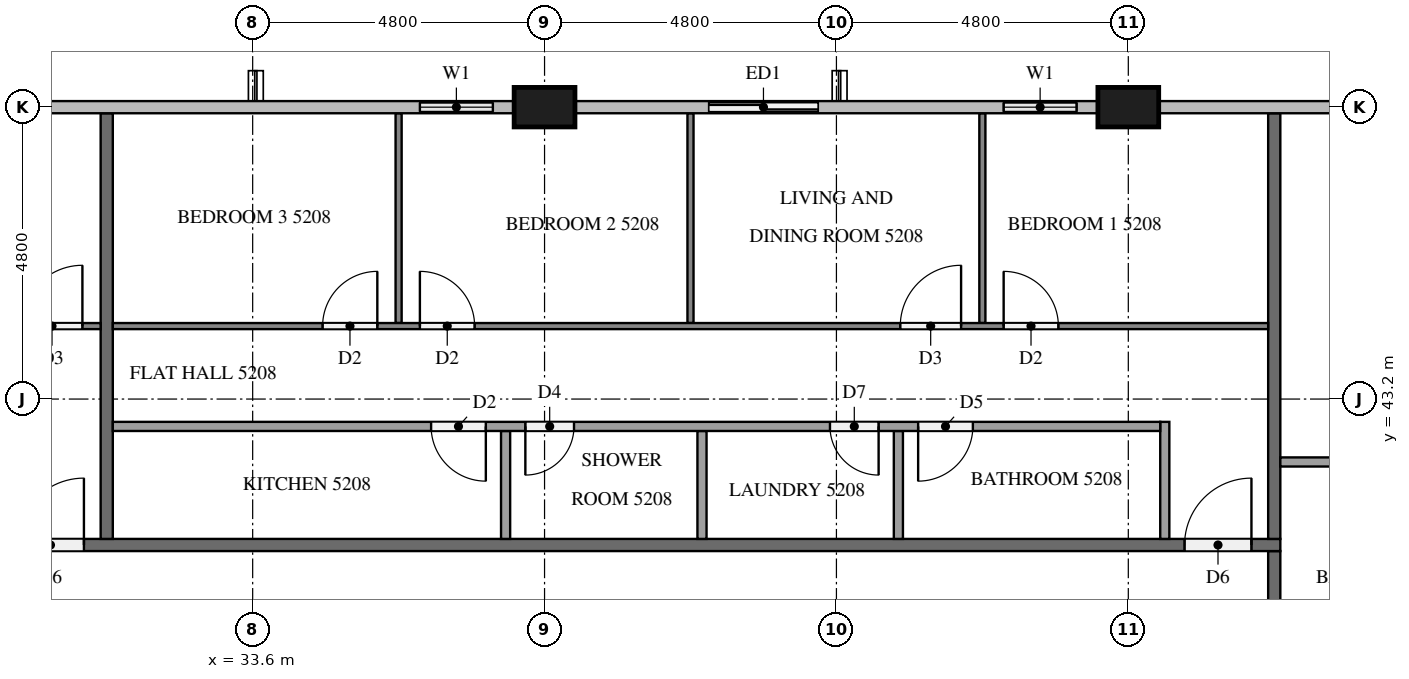
"""IFC4 building model, lengths in metres.
Left out: names, types, materials, properties, quantities, classifications, styles, units other than length and angle.
Written with IfcOpenShell. Run it as: python <this file> out.ifc"""

import sys

from ifc_helpers import new_model, si_unit, direction, frame, frame_2d, origin, origin_2d, place, context, subcontext, project, spatial, rectangle, extrude, element, fill, save


model = new_model("IFC4")
c1 = context("Model", 3, precision=1e-05, world=origin(), true_north=direction((0.0, 1.0)))
c2 = subcontext(c1, "Body", "Model", "MODEL_VIEW")
j1 = project(units=[si_unit("LENGTHUNIT", "METRE"), si_unit("PLANEANGLEUNIT", "RADIAN")], contexts=[c1])
p1 = place(None, origin())
s1 = spatial("IfcSite", under=j1, at=p1, CompositionType="ELEMENT")
p2 = place(p1, origin())
s2 = spatial("IfcBuilding", under=s1, at=p2, CompositionType="ELEMENT")
p3 = place(p2, frame((0.0, 0.0, 199.9)))
s3 = spatial("IfcBuildingStorey", under=s2, at=p3, CompositionType="ELEMENT", Elevation=199.9)
for number, where, z_axis, x_axis in (
    (1, (48.0, 48.0, 0.0), (0.0, 0.0, 1.0), (1.0, 0.0, 0.0)),
    (2, (38.4, 48.0, 0.0), (0.0, 0.0, 1.0), (1.0, 0.0, 0.0)),
):
    element("IfcColumn", number, at=place(p3, frame(where, z_axis=z_axis, x_axis=x_axis)), inside=s3, PredefinedType="COLUMN", context=c2, shape_type="SweptSolid", body=[
        extrude(rectangle(XDim=1.0, YDim=0.65, at=origin_2d()), origin(), (0.0, 0.0, 1.0), 3.1),
    ])
p4 = place(p3, frame((47.5, 48.0, 0.0), z_axis=(0.0, 0.0, 1.0), x_axis=(-1.0, 0.0, 0.0)))
e3 = element("IfcWall", 3, at=p4, inside=s3, PredefinedType="SOLIDWALL", context=c2, shape_type="SweptSolid", body=[
    extrude(rectangle(XDim=1.9, YDim=0.15, at=frame_2d((0.95, 0.0))), origin(), (0.0, 0.0, 1.0), 3.1),
])
p5 = place(p4, frame((0.35, 0.0, 0.9)))
e4 = element("IfcOpeningElement", 4, at=p5, cuts=e3, PredefinedType="OPENING", context=c2, shape_type="SweptSolid", body=[
    extrude(rectangle(XDim=1.2, YDim=1.4, at=frame_2d((0.6, 0.7))), frame((0.0, 0.085, 0.0), z_axis=(0.0, -1.0, 0.0), x_axis=(1.0, 0.0, 0.0)), (0.0, 0.0, 1.0), 0.17),
])
p6 = place(p3, frame((43.2, 48.0, 0.0), z_axis=(0.0, 0.0, 1.0), x_axis=(-1.0, 0.0, 0.0)))
e5 = element("IfcWall", 5, at=p6, inside=s3, PredefinedType="SOLIDWALL", context=c2, shape_type="SweptSolid", body=[
    extrude(rectangle(XDim=2.4, YDim=0.15, at=frame_2d((1.2, 0.0))), origin(), (0.0, 0.0, 1.0), 3.1),
])
p7 = place(p6, frame((0.3, 0.0, 0.0)))
e6 = element("IfcOpeningElement", 6, at=p7, cuts=e5, PredefinedType="OPENING", context=c2, shape_type="SweptSolid", body=[
    extrude(rectangle(XDim=1.8, YDim=2.4, at=frame_2d((0.9, 1.2))), frame((0.0, 0.085, 0.0), z_axis=(0.0, -1.0, 0.0), x_axis=(1.0, 0.0, 0.0)), (0.0, 0.0, 1.0), 0.17),
])
p8 = place(p3, frame((37.9, 48.0, 0.0), z_axis=(0.0, 0.0, 1.0), x_axis=(-1.0, 0.0, 0.0)))
e7 = element("IfcWall", 7, at=p8, inside=s3, PredefinedType="SOLIDWALL", context=c2, shape_type="SweptSolid", body=[
    extrude(rectangle(XDim=1.9, YDim=0.15, at=frame_2d((0.95, 0.0))), origin(), (0.0, 0.0, 1.0), 3.1),
])
p9 = place(p8, frame((0.35, 0.0, 0.9)))
e8 = element("IfcOpeningElement", 8, at=p9, cuts=e7, PredefinedType="OPENING", context=c2, shape_type="SweptSolid", body=[
    extrude(rectangle(XDim=1.2, YDim=1.4, at=frame_2d((0.6, 0.7))), frame((0.0, 0.085, 0.0), z_axis=(0.0, -1.0, 0.0), x_axis=(1.0, 0.0, 0.0)), (0.0, 0.0, 1.0), 0.17),
])
p10 = place(p3, frame((50.4, 40.7, 0.0), z_axis=(0.0, 0.0, 1.0), x_axis=(0.0, -1.0, 0.0)))
e9 = element("IfcWall", 9, at=p10, inside=s3, PredefinedType="PARTITIONING", context=c2, shape_type="SweptSolid", body=[
    extrude(rectangle(XDim=28.6, YDim=0.2, at=frame_2d((14.3, 0.0))), origin(), (0.0, 0.0, 1.0), 3.1),
])
p11 = place(p10, frame((21.875, 0.0, 0.0)))
e10 = element("IfcOpeningElement", 10, at=p11, cuts=e9, PredefinedType="OPENING", context=c2, shape_type="SweptSolid", body=[
    extrude(rectangle(XDim=1.1, YDim=2.1, at=frame_2d((0.55, 1.05))), frame((0.0, 0.11, 0.0), z_axis=(0.0, -1.0, 0.0), x_axis=(1.0, 0.0, 0.0)), (0.0, 0.0, 1.0), 0.22),
])
p12 = place(p10, frame((7.525, 0.0, 0.0)))
e11 = element("IfcOpeningElement", 11, at=p12, cuts=e9, PredefinedType="OPENING", context=c2, shape_type="SweptSolid", body=[
    extrude(rectangle(XDim=1.0, YDim=2.1, at=frame_2d((0.5, 1.05))), frame((0.0, 0.11, 0.0), z_axis=(0.0, -1.0, 0.0), x_axis=(1.0, 0.0, 0.0)), (0.0, 0.0, 1.0), 0.22),
])
p13 = place(p10, frame((5.675, 0.0, 0.0)))
e12 = element("IfcOpeningElement", 12, at=p13, cuts=e9, PredefinedType="OPENING", context=c2, shape_type="SweptSolid", body=[
    extrude(rectangle(XDim=1.0, YDim=2.1, at=frame_2d((0.5, 1.05))), frame((0.0, 0.11, 0.0), z_axis=(0.0, -1.0, 0.0), x_axis=(1.0, 0.0, 0.0)), (0.0, 0.0, 1.0), 0.22),
])
p14 = place(p3, frame((11.9, 40.8, 0.0), z_axis=(0.0, 0.0, 1.0), x_axis=(1.0, 0.0, 0.0)))
e13 = element("IfcWall", 13, at=p14, inside=s3, PredefinedType="PARTITIONING", context=c2, shape_type="SweptSolid", body=[
    extrude(rectangle(XDim=38.6, YDim=0.2, at=frame_2d((19.3, 0.0))), origin(), (0.0, 0.0, 1.0), 3.1),
])
p15 = place(p14, frame((37.025, 0.0, 0.0)))
e14 = element("IfcOpeningElement", 14, at=p15, cuts=e13, PredefinedType="OPENING", context=c2, shape_type="SweptSolid", body=[
    extrude(rectangle(XDim=1.1, YDim=2.1, at=frame_2d((0.55, 1.05))), frame((0.0, 0.11, 0.0), z_axis=(0.0, -1.0, 0.0), x_axis=(1.0, 0.0, 0.0)), (0.0, 0.0, 1.0), 0.22),
])
p16 = place(p14, frame((17.825, 0.0, 0.0)))
e15 = element("IfcOpeningElement", 15, at=p16, cuts=e13, PredefinedType="OPENING", context=c2, shape_type="SweptSolid", body=[
    extrude(rectangle(XDim=1.1, YDim=2.1, at=frame_2d((0.55, 1.05))), frame((0.0, 0.11, 0.0), z_axis=(0.0, -1.0, 0.0), x_axis=(1.0, 0.0, 0.0)), (0.0, 0.0, 1.0), 0.22),
])
for number, where, z_axis, x_axis in (
    (16, (50.4, 40.9, 0.0), (0.0, 0.0, 1.0), (0.0, 1.0, 0.0)),
    (17, (31.2, 47.9, 0.0), (0.0, 0.0, 1.0), (0.0, -1.0, 0.0)),
):
    element("IfcWall", number, at=place(p3, frame(where, z_axis=z_axis, x_axis=x_axis)), inside=s3, PredefinedType="PARTITIONING", context=c2, shape_type="SweptSolid", body=[
        extrude(rectangle(XDim=7.0, YDim=0.2, at=frame_2d((3.5, 0.0))), origin(), (0.0, 0.0, 1.0), 3.1),
    ])
p17 = place(p3, frame((50.5, 42.165, 0.0), z_axis=(0.0, 0.0, 1.0), x_axis=(1.0, 0.0, 0.0)))
e18 = element("IfcWall", 18, at=p17, inside=s3, PredefinedType="PARTITIONING", context=c2, shape_type="SweptSolid", body=[
    extrude(rectangle(XDim=4.175, YDim=0.15, at=frame_2d((2.087, 0.0))), origin(), (0.0, 0.0, 1.0), 3.1),
])
for number, where, z_axis, x_axis in (
    (19, (45.6, 44.45, 0.0), (0.0, 0.0, 1.0), (0.0, 1.0, 0.0)),
    (20, (40.8, 44.45, 0.0), (0.0, 0.0, 1.0), (0.0, 1.0, 0.0)),
    (21, (36.0, 44.45, 0.0), (0.0, 0.0, 1.0), (0.0, 1.0, 0.0)),
):
    element("IfcWall", number, at=place(p3, frame(where, z_axis=z_axis, x_axis=x_axis)), inside=s3, PredefinedType="PARTITIONING", context=c2, shape_type="SweptSolid", body=[
        extrude(rectangle(XDim=3.45, YDim=0.1, at=frame_2d((1.725, 0.0))), origin(), (0.0, 0.0, 1.0), 3.1),
    ])
p18 = place(p3, frame((31.3, 44.4, 0.0), z_axis=(0.0, 0.0, 1.0), x_axis=(1.0, 0.0, 0.0)))
e22 = element("IfcWall", 22, at=p18, inside=s3, PredefinedType="PARTITIONING", context=c2, shape_type="SweptSolid", body=[
    extrude(rectangle(XDim=19.0, YDim=0.1, at=frame_2d((9.5, 0.0))), origin(), (0.0, 0.0, 1.0), 3.1),
])
p19 = place(p18, frame((14.65, 0.0, 0.0)))
e23 = element("IfcOpeningElement", 23, at=p19, cuts=e22, PredefinedType="OPENING", context=c2, shape_type="SweptSolid", body=[
    extrude(rectangle(XDim=0.9, YDim=2.1, at=frame_2d((0.45, 1.05))), frame((0.0, 0.06, 0.0), z_axis=(0.0, -1.0, 0.0), x_axis=(1.0, 0.0, 0.0)), (0.0, 0.0, 1.0), 0.12),
])
p20 = place(p18, frame((12.95, 0.0, 0.0)))
e24 = element("IfcOpeningElement", 24, at=p20, cuts=e22, PredefinedType="OPENING", context=c2, shape_type="SweptSolid", body=[
    extrude(rectangle(XDim=1.0, YDim=2.1, at=frame_2d((0.5, 1.05))), frame((0.0, 0.06, 0.0), z_axis=(0.0, -1.0, 0.0), x_axis=(1.0, 0.0, 0.0)), (0.0, 0.0, 1.0), 0.12),
])
p21 = place(p18, frame((5.05, 0.0, 0.0)))
e25 = element("IfcOpeningElement", 25, at=p21, cuts=e22, PredefinedType="OPENING", context=c2, shape_type="SweptSolid", body=[
    extrude(rectangle(XDim=0.9, YDim=2.1, at=frame_2d((0.45, 1.05))), frame((0.0, 0.06, 0.0), z_axis=(0.0, -1.0, 0.0), x_axis=(1.0, 0.0, 0.0)), (0.0, 0.0, 1.0), 0.12),
])
p22 = place(p18, frame((3.45, 0.0, 0.0)))
e26 = element("IfcOpeningElement", 26, at=p22, cuts=e22, PredefinedType="OPENING", context=c2, shape_type="SweptSolid", body=[
    extrude(rectangle(XDim=0.9, YDim=2.1, at=frame_2d((0.45, 1.05))), frame((0.0, 0.06, 0.0), z_axis=(0.0, -1.0, 0.0), x_axis=(1.0, 0.0, 0.0)), (0.0, 0.0, 1.0), 0.12),
])
for number, where, z_axis, x_axis in (
    (27, (44.219, 40.9, 0.0), (0.0, 0.0, 1.0), (0.0, 1.0, 0.0)),
    (28, (40.989, 40.9, 0.0), (0.0, 0.0, 1.0), (0.0, 1.0, 0.0)),
    (29, (37.76, 40.9, 0.0), (0.0, 0.0, 1.0), (0.0, 1.0, 0.0)),
):
    element("IfcWall", number, at=place(p3, frame(where, z_axis=z_axis, x_axis=x_axis)), inside=s3, PredefinedType="PARTITIONING", context=c2, shape_type="SweptSolid", body=[
        extrude(rectangle(XDim=1.775, YDim=0.15, at=frame_2d((0.888, 0.0))), origin(), (0.0, 0.0, 1.0), 3.1),
    ])
p23 = place(p3, frame((48.6, 40.9, 0.0), z_axis=(0.0, 0.0, 1.0), x_axis=(0.0, 1.0, 0.0)))
e30 = element("IfcWall", 30, at=p23, inside=s3, PredefinedType="PARTITIONING", context=c2, shape_type="SweptSolid", body=[
    extrude(rectangle(XDim=1.925, YDim=0.15, at=frame_2d((0.962, 0.0))), origin(), (0.0, 0.0, 1.0), 3.1),
])
p24 = place(p3, frame((48.525, 42.75, 0.0), z_axis=(0.0, 0.0, 1.0), x_axis=(-1.0, 0.0, 0.0)))
e31 = element("IfcWall", 31, at=p24, inside=s3, PredefinedType="PARTITIONING", context=c2, shape_type="SweptSolid", body=[
    extrude(rectangle(XDim=17.225, YDim=0.15, at=frame_2d((8.612, 0.0))), origin(), (0.0, 0.0, 1.0), 3.1),
])
p25 = place(p24, frame((3.081, 0.0, 0.0)))
e32 = element("IfcOpeningElement", 32, at=p25, cuts=e31, PredefinedType="OPENING", context=c2, shape_type="SweptSolid", body=[
    extrude(rectangle(XDim=0.9, YDim=2.1, at=frame_2d((0.45, 1.05))), frame((0.0, 0.085, 0.0), z_axis=(0.0, -1.0, 0.0), x_axis=(1.0, 0.0, 0.0)), (0.0, 0.0, 1.0), 0.17),
])
p26 = place(p24, frame((4.631, 0.0, 0.0)))
e33 = element("IfcOpeningElement", 33, at=p26, cuts=e31, PredefinedType="OPENING", context=c2, shape_type="SweptSolid", body=[
    extrude(rectangle(XDim=0.8, YDim=2.1, at=frame_2d((0.4, 1.05))), frame((0.0, 0.085, 0.0), z_axis=(0.0, -1.0, 0.0), x_axis=(1.0, 0.0, 0.0)), (0.0, 0.0, 1.0), 0.17),
])
p27 = place(p24, frame((9.641, 0.0, 0.0)))
e34 = element("IfcOpeningElement", 34, at=p27, cuts=e31, PredefinedType="OPENING", context=c2, shape_type="SweptSolid", body=[
    extrude(rectangle(XDim=0.8, YDim=2.1, at=frame_2d((0.4, 1.05))), frame((0.0, 0.085, 0.0), z_axis=(0.0, -1.0, 0.0), x_axis=(1.0, 0.0, 0.0)), (0.0, 0.0, 1.0), 0.17),
])
p28 = place(p24, frame((11.091, 0.0, 0.0)))
e35 = element("IfcOpeningElement", 35, at=p28, cuts=e31, PredefinedType="OPENING", context=c2, shape_type="SweptSolid", body=[
    extrude(rectangle(XDim=0.9, YDim=2.1, at=frame_2d((0.45, 1.05))), frame((0.0, 0.085, 0.0), z_axis=(0.0, -1.0, 0.0), x_axis=(1.0, 0.0, 0.0)), (0.0, 0.0, 1.0), 0.17),
])
p29 = place(p3, frame((12.1, 44.4, 0.0), z_axis=(0.0, 0.0, 1.0), x_axis=(1.0, 0.0, 0.0)))
e36 = element("IfcWall", 36, at=p29, inside=s3, PredefinedType="PARTITIONING", context=c2, shape_type="SweptSolid", body=[
    extrude(rectangle(XDim=19.0, YDim=0.1, at=frame_2d((9.5, 0.0))), origin(), (0.0, 0.0, 1.0), 3.1),
])
p30 = place(p29, frame((17.7, 0.0, 0.0)))
e37 = element("IfcOpeningElement", 37, at=p30, cuts=e36, PredefinedType="OPENING", context=c2, shape_type="SweptSolid", body=[
    extrude(rectangle(XDim=1.0, YDim=2.1, at=frame_2d((0.5, 1.05))), frame((0.0, 0.06, 0.0), z_axis=(0.0, -1.0, 0.0), x_axis=(1.0, 0.0, 0.0)), (0.0, 0.0, 1.0), 0.12),
])
p31 = place(p29, frame((9.85, 0.0, 0.0)))
e38 = element("IfcOpeningElement", 38, at=p31, cuts=e36, PredefinedType="OPENING", context=c2, shape_type="SweptSolid", body=[
    extrude(rectangle(XDim=0.9, YDim=2.1, at=frame_2d((0.45, 1.05))), frame((0.0, 0.06, 0.0), z_axis=(0.0, -1.0, 0.0), x_axis=(1.0, 0.0, 0.0)), (0.0, 0.0, 1.0), 0.12),
])
p32 = place(p29, frame((8.25, 0.0, 0.0)))
e39 = element("IfcOpeningElement", 39, at=p32, cuts=e36, PredefinedType="OPENING", context=c2, shape_type="SweptSolid", body=[
    extrude(rectangle(XDim=0.9, YDim=2.1, at=frame_2d((0.45, 1.05))), frame((0.0, 0.06, 0.0), z_axis=(0.0, -1.0, 0.0), x_axis=(1.0, 0.0, 0.0)), (0.0, 0.0, 1.0), 0.12),
])
p33 = place(p29, frame((0.3, 0.0, 0.0)))
e40 = element("IfcOpeningElement", 40, at=p33, cuts=e36, PredefinedType="OPENING", context=c2, shape_type="SweptSolid", body=[
    extrude(rectangle(XDim=0.9, YDim=2.1, at=frame_2d((0.45, 1.05))), frame((0.0, 0.06, 0.0), z_axis=(0.0, -1.0, 0.0), x_axis=(1.0, 0.0, 0.0)), (0.0, 0.0, 1.0), 0.12),
])
p34 = place(p5, origin())
e41 = element("IfcWindow", 41, at=p34, inside=s3, PartitioningType="SINGLE_PANEL", PredefinedType="WINDOW", context=c2, shape_type="SweptSolid", body=[
    extrude(rectangle(XDim=1.2, YDim=1.4, at=frame_2d((0.6, 0.7))), frame((0.0, 0.03, 0.0), z_axis=(0.0, -1.0, 0.0), x_axis=(1.0, 0.0, 0.0)), (0.0, 0.0, 1.0), 0.06),
])
fill(e4, e41)
p35 = place(p7, origin())
e42 = element("IfcDoor", 42, at=p35, inside=s3, OperationType="SLIDING_TO_RIGHT", PredefinedType="DOOR", context=c2, shape_type="SweptSolid", body=[
    extrude(rectangle(XDim=1.8, YDim=2.4, at=frame_2d((0.9, 1.2))), frame((0.0, 0.025, 0.0), z_axis=(0.0, -1.0, 0.0), x_axis=(1.0, 0.0, 0.0)), (0.0, 0.0, 1.0), 0.05),
])
fill(e6, e42)
p36 = place(p9, origin())
e43 = element("IfcWindow", 43, at=p36, inside=s3, PartitioningType="SINGLE_PANEL", PredefinedType="WINDOW", context=c2, shape_type="SweptSolid", body=[
    extrude(rectangle(XDim=1.2, YDim=1.4, at=frame_2d((0.6, 0.7))), frame((0.0, 0.03, 0.0), z_axis=(0.0, -1.0, 0.0), x_axis=(1.0, 0.0, 0.0)), (0.0, 0.0, 1.0), 0.06),
])
fill(e8, e43)
p37 = place(p15, origin())
e44 = element("IfcDoor", 44, at=p37, inside=s3, OperationType="SINGLE_SWING_RIGHT", PredefinedType="DOOR", context=c2, shape_type="SweptSolid", body=[
    extrude(rectangle(XDim=1.1, YDim=2.1, at=frame_2d((0.55, 1.05))), frame((0.0, 0.025, 0.0), z_axis=(0.0, -1.0, 0.0), x_axis=(1.0, 0.0, 0.0)), (0.0, 0.0, 1.0), 0.05),
])
fill(e14, e44)
p38 = place(p16, origin())
e45 = element("IfcDoor", 45, at=p38, inside=s3, OperationType="SINGLE_SWING_RIGHT", PredefinedType="DOOR", context=c2, shape_type="SweptSolid", body=[
    extrude(rectangle(XDim=1.1, YDim=2.1, at=frame_2d((0.55, 1.05))), frame((0.0, 0.025, 0.0), z_axis=(0.0, -1.0, 0.0), x_axis=(1.0, 0.0, 0.0)), (0.0, 0.0, 1.0), 0.05),
])
fill(e15, e45)
p39 = place(p19, origin())
e46 = element("IfcDoor", 46, at=p39, inside=s3, OperationType="SINGLE_SWING_LEFT", PredefinedType="DOOR", context=c2, shape_type="SweptSolid", body=[
    extrude(rectangle(XDim=0.9, YDim=2.1, at=frame_2d((0.45, 1.05))), frame((0.0, 0.025, 0.0), z_axis=(0.0, -1.0, 0.0), x_axis=(1.0, 0.0, 0.0)), (0.0, 0.0, 1.0), 0.05),
])
fill(e23, e46)
p40 = place(p20, origin())
e47 = element("IfcDoor", 47, at=p40, inside=s3, OperationType="SINGLE_SWING_RIGHT", PredefinedType="DOOR", context=c2, shape_type="SweptSolid", body=[
    extrude(rectangle(XDim=1.0, YDim=2.1, at=frame_2d((0.5, 1.05))), frame((0.0, 0.025, 0.0), z_axis=(0.0, -1.0, 0.0), x_axis=(1.0, 0.0, 0.0)), (0.0, 0.0, 1.0), 0.05),
])
fill(e24, e47)
p41 = place(p21, origin())
e48 = element("IfcDoor", 48, at=p41, inside=s3, OperationType="SINGLE_SWING_LEFT", PredefinedType="DOOR", context=c2, shape_type="SweptSolid", body=[
    extrude(rectangle(XDim=0.9, YDim=2.1, at=frame_2d((0.45, 1.05))), frame((0.0, 0.025, 0.0), z_axis=(0.0, -1.0, 0.0), x_axis=(1.0, 0.0, 0.0)), (0.0, 0.0, 1.0), 0.05),
])
fill(e25, e48)
p42 = place(p22, origin())
e49 = element("IfcDoor", 49, at=p42, inside=s3, OperationType="SINGLE_SWING_RIGHT", PredefinedType="DOOR", context=c2, shape_type="SweptSolid", body=[
    extrude(rectangle(XDim=0.9, YDim=2.1, at=frame_2d((0.45, 1.05))), frame((0.0, 0.025, 0.0), z_axis=(0.0, -1.0, 0.0), x_axis=(1.0, 0.0, 0.0)), (0.0, 0.0, 1.0), 0.05),
])
fill(e26, e49)
p43 = place(p25, origin())
e50 = element("IfcDoor", 50, at=p43, inside=s3, OperationType="SINGLE_SWING_RIGHT", PredefinedType="DOOR", context=c2, shape_type="SweptSolid", body=[
    extrude(rectangle(XDim=0.9, YDim=2.1, at=frame_2d((0.45, 1.05))), frame((0.0, 0.025, 0.0), z_axis=(0.0, -1.0, 0.0), x_axis=(1.0, 0.0, 0.0)), (0.0, 0.0, 1.0), 0.05),
])
fill(e32, e50)
p44 = place(p26, origin())
e51 = element("IfcDoor", 51, at=p44, inside=s3, OperationType="SINGLE_SWING_LEFT", PredefinedType="DOOR", context=c2, shape_type="SweptSolid", body=[
    extrude(rectangle(XDim=0.8, YDim=2.1, at=frame_2d((0.4, 1.05))), frame((0.0, 0.025, 0.0), z_axis=(0.0, -1.0, 0.0), x_axis=(1.0, 0.0, 0.0)), (0.0, 0.0, 1.0), 0.05),
])
fill(e33, e51)
p45 = place(p27, origin())
e52 = element("IfcDoor", 52, at=p45, inside=s3, OperationType="SINGLE_SWING_RIGHT", PredefinedType="DOOR", context=c2, shape_type="SweptSolid", body=[
    extrude(rectangle(XDim=0.8, YDim=2.1, at=frame_2d((0.4, 1.05))), frame((0.0, 0.025, 0.0), z_axis=(0.0, -1.0, 0.0), x_axis=(1.0, 0.0, 0.0)), (0.0, 0.0, 1.0), 0.05),
])
fill(e34, e52)
p46 = place(p28, origin())
e53 = element("IfcDoor", 53, at=p46, inside=s3, OperationType="SINGLE_SWING_LEFT", PredefinedType="DOOR", context=c2, shape_type="SweptSolid", body=[
    extrude(rectangle(XDim=0.9, YDim=2.1, at=frame_2d((0.45, 1.05))), frame((0.0, 0.025, 0.0), z_axis=(0.0, -1.0, 0.0), x_axis=(1.0, 0.0, 0.0)), (0.0, 0.0, 1.0), 0.05),
])
fill(e35, e53)
p47 = place(p30, origin())
e54 = element("IfcDoor", 54, at=p47, inside=s3, OperationType="SINGLE_SWING_RIGHT", PredefinedType="DOOR", context=c2, shape_type="SweptSolid", body=[
    extrude(rectangle(XDim=1.0, YDim=2.1, at=frame_2d((0.5, 1.05))), frame((0.0, 0.025, 0.0), z_axis=(0.0, -1.0, 0.0), x_axis=(1.0, 0.0, 0.0)), (0.0, 0.0, 1.0), 0.05),
])
fill(e37, e54)
save(model, sys.argv[1])
